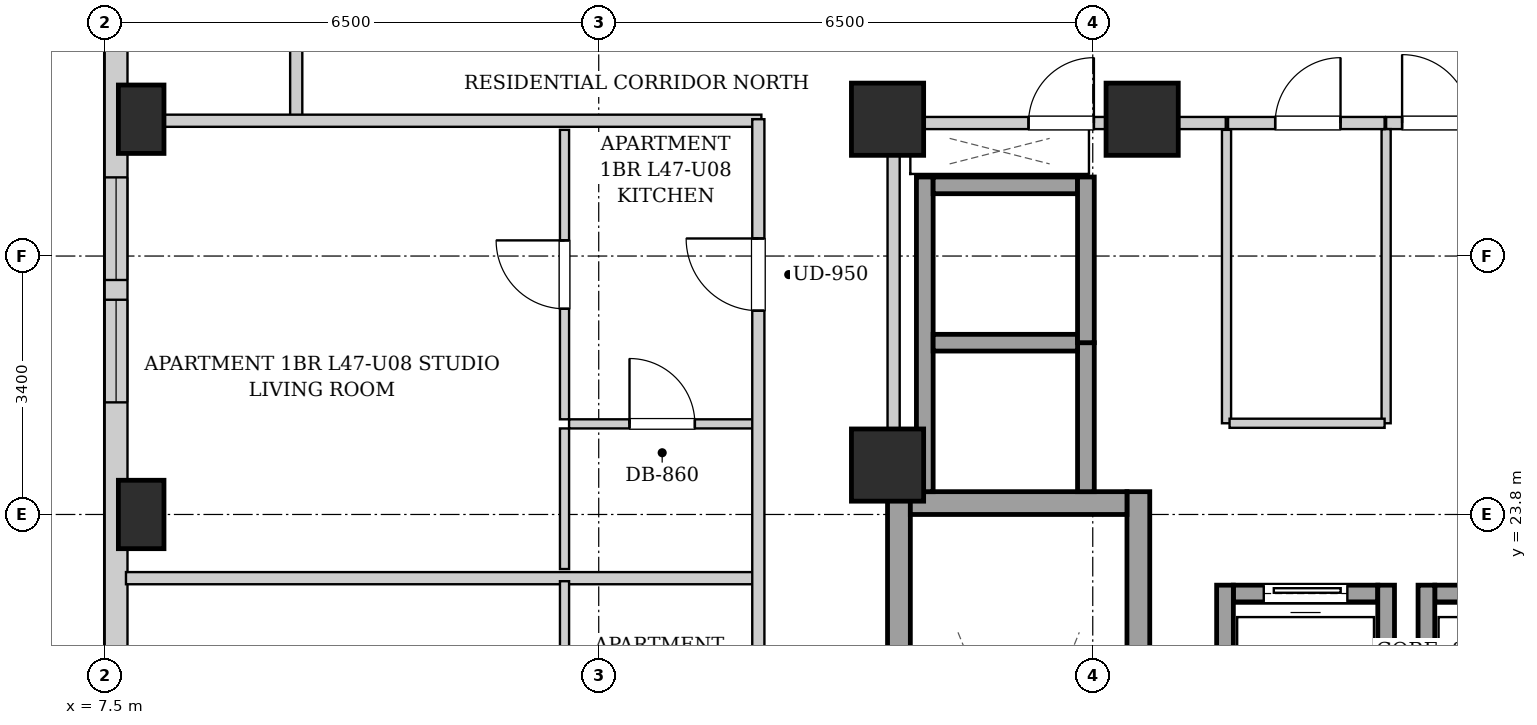
"""IFC4 building model, lengths in metres.
Left out: names, types, materials, properties, quantities, classifications, styles, units other than length and angle.
Written with IfcOpenShell. Run it as: python <this file> out.ifc"""

import sys

from ifc_helpers import new_model, si_unit, direction, frame, frame_2d, origin, origin_2d, place, context, subcontext, project, spatial, rectangle, extrude, element, fill, save


model = new_model("IFC4")
c1 = context("Model", 3, precision=1e-05, world=origin(), true_north=direction((0.0, 1.0)))
c2 = subcontext(c1, "Body", "Model", "MODEL_VIEW")
j1 = project(units=[si_unit("LENGTHUNIT", "METRE"), si_unit("PLANEANGLEUNIT", "RADIAN")], contexts=[c1])
p1 = place(None, origin())
s1 = spatial("IfcSite", under=j1, at=p1, CompositionType="ELEMENT")
p2 = place(p1, origin())
s2 = spatial("IfcBuilding", under=s1, at=p2, CompositionType="ELEMENT")
p3 = place(p2, frame((0.0, 0.0, 163.4)))
s3 = spatial("IfcBuildingStorey", under=s2, at=p3, CompositionType="ELEMENT", Elevation=163.4)
for number, where, z_axis, x_axis in (
    (1, (7.98, 23.8, 0.0), (0.0, 0.0, 1.0), (1.0, 0.0, 0.0)),
    (2, (7.98, 29.0, 0.0), (0.0, 0.0, 1.0), (1.0, 0.0, 0.0)),
):
    element("IfcColumn", number, at=place(p3, frame(where, z_axis=z_axis, x_axis=x_axis)), inside=s3, PredefinedType="COLUMN", context=c2, shape_type="SweptSolid", body=[
        extrude(rectangle(XDim=0.6, YDim=0.9, at=origin_2d()), origin(), (0.0, 0.0, 1.0), 3.25),
    ])
for number, where, z_axis, x_axis in (
    (3, (17.8, 29.0, 0.0), (0.0, 0.0, 1.0), (1.0, 0.0, 0.0)),
    (4, (21.15, 29.0, 0.0), (0.0, 0.0, 1.0), (1.0, 0.0, 0.0)),
    (5, (17.8, 24.45, 0.0), (0.0, 0.0, 1.0), (1.0, 0.0, 0.0)),
):
    element("IfcColumn", number, at=place(p3, frame(where, z_axis=z_axis, x_axis=x_axis)), inside=s3, PredefinedType="COLUMN", context=c2, shape_type="SweptSolid", body=[
        extrude(rectangle(XDim=0.95, YDim=0.95, at=origin_2d()), origin(), (0.0, 0.0, 1.0), 3.25),
    ])
p4 = place(p3, frame((7.65, 6.3, 0.0), z_axis=(0.0, 0.0, 1.0), x_axis=(0.0, 1.0, 0.0)))
e6 = element("IfcWall", 6, at=p4, inside=s3, PredefinedType="SOLIDWALL", context=c2, shape_type="SweptSolid", body=[
    extrude(rectangle(XDim=34.5, YDim=0.3, at=frame_2d((17.25, 0.0))), origin(), (0.0, 0.0, 1.0), 2.99),
])
p5 = place(p4, frame((1.425, 0.0, 0.55)))
e7 = element("IfcOpeningElement", 7, at=p5, cuts=e6, PredefinedType="OPENING", context=c2, shape_type="SweptSolid", body=[
    extrude(rectangle(XDim=1.35, YDim=1.2, at=frame_2d((0.675, 0.6))), frame((0.0, 0.16, 0.0), z_axis=(0.0, -1.0, 0.0), x_axis=(1.0, 0.0, 0.0)), (0.0, 0.0, 1.0), 0.32),
])
p6 = place(p4, frame((30.15, 0.0, 0.55)))
e8 = element("IfcOpeningElement", 8, at=p6, cuts=e6, PredefinedType="OPENING", context=c2, shape_type="SweptSolid", body=[
    extrude(rectangle(XDim=1.35, YDim=1.2, at=frame_2d((0.675, 0.6))), frame((0.0, 0.16, 0.0), z_axis=(0.0, -1.0, 0.0), x_axis=(1.0, 0.0, 0.0)), (0.0, 0.0, 1.0), 0.32),
])
p7 = place(p4, frame((28.31, 0.0, 0.55)))
e9 = element("IfcOpeningElement", 9, at=p7, cuts=e6, PredefinedType="OPENING", context=c2, shape_type="SweptSolid", body=[
    extrude(rectangle(XDim=1.35, YDim=1.2, at=frame_2d((0.675, 0.6))), frame((0.0, 0.16, 0.0), z_axis=(0.0, -1.0, 0.0), x_axis=(1.0, 0.0, 0.0)), (0.0, 0.0, 1.0), 0.32),
])
p8 = place(p4, frame((11.85, 0.0, 0.55)))
e10 = element("IfcOpeningElement", 10, at=p8, cuts=e6, PredefinedType="OPENING", context=c2, shape_type="SweptSolid", body=[
    extrude(rectangle(XDim=1.35, YDim=1.2, at=frame_2d((0.675, 0.6))), frame((0.0, 0.16, 0.0), z_axis=(0.0, -1.0, 0.0), x_axis=(1.0, 0.0, 0.0)), (0.0, 0.0, 1.0), 0.32),
])
p9 = place(p4, frame((9.31, 0.0, 0.55)))
e11 = element("IfcOpeningElement", 11, at=p9, cuts=e6, PredefinedType="OPENING", context=c2, shape_type="SweptSolid", body=[
    extrude(rectangle(XDim=1.35, YDim=1.2, at=frame_2d((0.675, 0.6))), frame((0.0, 0.16, 0.0), z_axis=(0.0, -1.0, 0.0), x_axis=(1.0, 0.0, 0.0)), (0.0, 0.0, 1.0), 0.32),
])
p10 = place(p4, frame((18.975, 0.0, 0.55)))
e12 = element("IfcOpeningElement", 12, at=p10, cuts=e6, PredefinedType="OPENING", context=c2, shape_type="SweptSolid", body=[
    extrude(rectangle(XDim=1.35, YDim=1.2, at=frame_2d((0.675, 0.6))), frame((0.0, 0.16, 0.0), z_axis=(0.0, -1.0, 0.0), x_axis=(1.0, 0.0, 0.0)), (0.0, 0.0, 1.0), 0.32),
])
p11 = place(p4, frame((20.585, 0.0, 0.55)))
e13 = element("IfcOpeningElement", 13, at=p11, cuts=e6, PredefinedType="OPENING", context=c2, shape_type="SweptSolid", body=[
    extrude(rectangle(XDim=1.35, YDim=1.2, at=frame_2d((0.675, 0.6))), frame((0.0, 0.16, 0.0), z_axis=(0.0, -1.0, 0.0), x_axis=(1.0, 0.0, 0.0)), (0.0, 0.0, 1.0), 0.32),
])
for number, where, z_axis, x_axis in (
    (14, (17.95, 15.1, 0.0), (0.0, 0.0, 1.0), (0.0, 1.0, 0.0)),
    (15, (21.1, 15.1, 0.0), (0.0, 0.0, 1.0), (0.0, 1.0, 0.0)),
):
    element("IfcWall", number, at=place(p3, frame(where, z_axis=z_axis, x_axis=x_axis)), inside=s3, PredefinedType="SHEAR", context=c2, shape_type="SweptSolid", body=[
        extrude(rectangle(XDim=9.0, YDim=0.3, at=frame_2d((4.5, 0.0))), origin(), (0.0, 0.0, 1.0), 2.99),
    ])
p12 = place(p3, frame((18.1, 23.95, 0.0), z_axis=(0.0, 0.0, 1.0), x_axis=(1.0, 0.0, 0.0)))
e16 = element("IfcWall", 16, at=p12, inside=s3, PredefinedType="SHEAR", context=c2, shape_type="SweptSolid", body=[
    extrude(rectangle(XDim=2.85, YDim=0.3, at=frame_2d((1.425, 0.0))), origin(), (0.0, 0.0, 1.0), 2.99),
])
p13 = place(p3, frame((22.35, 22.76, 0.0), z_axis=(0.0, 0.0, 1.0), x_axis=(1.0, 0.0, 0.0)))
e17 = element("IfcWall", 17, at=p13, inside=s3, PredefinedType="SHEAR", context=c2, shape_type="SweptSolid", body=[
    extrude(rectangle(XDim=1.9, YDim=0.22, at=frame_2d((0.95, 0.0))), origin(), (0.0, 0.0, 1.0), 2.99),
])
p14 = place(p13, frame((0.4, 0.0, 0.0)))
e18 = element("IfcOpeningElement", 18, at=p14, cuts=e17, PredefinedType="OPENING", context=c2, shape_type="SweptSolid", body=[
    extrude(rectangle(XDim=1.1, YDim=2.15, at=frame_2d((0.55, 1.075))), frame((0.0, 0.12, 0.0), z_axis=(0.0, -1.0, 0.0), x_axis=(1.0, 0.0, 0.0)), (0.0, 0.0, 1.0), 0.24),
])
for number, where, z_axis, x_axis in (
    (19, (22.24, 20.43, 0.0), (0.0, 0.0, 1.0), (0.0, 1.0, 0.0)),
    (20, (24.36, 20.43, 0.0), (0.0, 0.0, 1.0), (0.0, 1.0, 0.0)),
):
    element("IfcWall", number, at=place(p3, frame(where, z_axis=z_axis, x_axis=x_axis)), inside=s3, PredefinedType="SHEAR", context=c2, shape_type="SweptSolid", body=[
        extrude(rectangle(XDim=2.44, YDim=0.22, at=frame_2d((1.22, 0.0))), origin(), (0.0, 0.0, 1.0), 2.99),
    ])
p15 = place(p3, frame((25.0, 22.76, 0.0), z_axis=(0.0, 0.0, 1.0), x_axis=(1.0, 0.0, 0.0)))
e21 = element("IfcWall", 21, at=p15, inside=s3, PredefinedType="SHEAR", context=c2, shape_type="SweptSolid", body=[
    extrude(rectangle(XDim=1.9, YDim=0.22, at=frame_2d((0.95, 0.0))), origin(), (0.0, 0.0, 1.0), 2.99),
])
p16 = place(p15, frame((0.4, 0.0, 0.0)))
e22 = element("IfcOpeningElement", 22, at=p16, cuts=e21, PredefinedType="OPENING", context=c2, shape_type="SweptSolid", body=[
    extrude(rectangle(XDim=1.1, YDim=2.15, at=frame_2d((0.55, 1.075))), frame((0.0, 0.12, 0.0), z_axis=(0.0, -1.0, 0.0), x_axis=(1.0, 0.0, 0.0)), (0.0, 0.0, 1.0), 0.24),
])
p17 = place(p3, frame((24.89, 20.43, 0.0), z_axis=(0.0, 0.0, 1.0), x_axis=(0.0, 1.0, 0.0)))
e23 = element("IfcWall", 23, at=p17, inside=s3, PredefinedType="SHEAR", context=c2, shape_type="SweptSolid", body=[
    extrude(rectangle(XDim=2.44, YDim=0.22, at=frame_2d((1.22, 0.0))), origin(), (0.0, 0.0, 1.0), 2.99),
])
p18 = place(p3, frame((18.29, 24.1, 0.0), z_axis=(0.0, 0.0, 1.0), x_axis=(0.0, 1.0, 0.0)))
e24 = element("IfcWall", 24, at=p18, inside=s3, PredefinedType="SHEAR", context=c2, shape_type="SweptSolid", body=[
    extrude(rectangle(XDim=4.14, YDim=0.22, at=frame_2d((2.07, 0.0))), origin(), (0.0, 0.0, 1.0), 2.99),
])
p19 = place(p3, frame((20.41, 24.1, 0.0), z_axis=(0.0, 0.0, 1.0), x_axis=(0.0, 1.0, 0.0)))
e25 = element("IfcWall", 25, at=p19, inside=s3, PredefinedType="SHEAR", context=c2, shape_type="SweptSolid", body=[
    extrude(rectangle(XDim=1.96, YDim=0.22, at=frame_2d((0.98, 0.0))), origin(), (0.0, 0.0, 1.0), 2.99),
])
for number, where, z_axis, x_axis in (
    (26, (18.4, 26.06, 0.0), (0.0, 0.0, 1.0), (1.0, 0.0, 0.0)),
    (27, (18.4, 28.13, 0.0), (0.0, 0.0, 1.0), (1.0, 0.0, 0.0)),
):
    element("IfcWall", number, at=place(p3, frame(where, z_axis=z_axis, x_axis=x_axis)), inside=s3, PredefinedType="SHEAR", context=c2, shape_type="SweptSolid", body=[
        extrude(rectangle(XDim=1.9, YDim=0.22, at=frame_2d((0.95, 0.0))), origin(), (0.0, 0.0, 1.0), 2.99),
    ])
p20 = place(p3, frame((20.41, 26.06, 0.0), z_axis=(0.0, 0.0, 1.0), x_axis=(0.0, 1.0, 0.0)))
e28 = element("IfcWall", 28, at=p20, inside=s3, PredefinedType="SHEAR", context=c2, shape_type="SweptSolid", body=[
    extrude(rectangle(XDim=2.18, YDim=0.22, at=frame_2d((1.09, 0.0))), origin(), (0.0, 0.0, 1.0), 2.99),
])
p21 = place(p3, frame((17.88, 24.12, 0.0), z_axis=(0.0, 0.0, 1.0), x_axis=(0.0, 1.0, 0.0)))
e29 = element("IfcWall", 29, at=p21, inside=s3, PredefinedType="PARTITIONING", context=c2, shape_type="SweptSolid", body=[
    extrude(rectangle(XDim=4.76, YDim=0.16, at=frame_2d((2.38, 0.0))), origin(), (0.0, 0.0, 1.0), 2.99),
])
p22 = place(p3, frame((24.36, 28.95, 0.0), z_axis=(0.0, 0.0, 1.0), x_axis=(1.0, 0.0, 0.0)))
e30 = element("IfcWall", 30, at=p22, inside=s3, PredefinedType="PARTITIONING", context=c2, shape_type="SweptSolid", body=[
    extrude(rectangle(XDim=1.32, YDim=0.16, at=frame_2d((0.66, 0.0))), origin(), (0.0, 0.0, 1.0), 2.442),
])
p23 = place(p22, frame((0.21, 0.0, 0.0)))
e31 = element("IfcOpeningElement", 31, at=p23, cuts=e30, PredefinedType="OPENING", context=c2, shape_type="SweptSolid", body=[
    extrude(rectangle(XDim=0.9, YDim=2.05, at=frame_2d((0.45, 1.025))), frame((0.0, 0.09, 0.0), z_axis=(0.0, -1.0, 0.0), x_axis=(1.0, 0.0, 0.0)), (0.0, 0.0, 1.0), 0.18),
])
p24 = place(p3, frame((17.96, 28.95, 0.0), z_axis=(0.0, 0.0, 1.0), x_axis=(1.0, 0.0, 0.0)))
e32 = element("IfcWall", 32, at=p24, inside=s3, PredefinedType="PARTITIONING", context=c2, shape_type="SweptSolid", body=[
    extrude(rectangle(XDim=4.29, YDim=0.16, at=frame_2d((2.145, 0.0))), origin(), (0.0, 0.0, 1.0), 2.442),
])
p25 = place(p24, frame((1.695, 0.0, 0.0)))
e33 = element("IfcOpeningElement", 33, at=p25, cuts=e32, PredefinedType="OPENING", context=c2, shape_type="SweptSolid", body=[
    extrude(rectangle(XDim=0.86, YDim=2.05, at=frame_2d((0.43, 1.025))), frame((0.0, 0.09, 0.0), z_axis=(0.0, -1.0, 0.0), x_axis=(1.0, 0.0, 0.0)), (0.0, 0.0, 1.0), 0.18),
])
p26 = place(p3, frame((24.36, 25.0, 0.0), z_axis=(0.0, 0.0, 1.0), x_axis=(0.0, 1.0, 0.0)))
e34 = element("IfcWall", 34, at=p26, inside=s3, PredefinedType="PARTITIONING", context=c2, shape_type="SweptSolid", body=[
    extrude(rectangle(XDim=3.87, YDim=0.12, at=frame_2d((1.935, 0.0))), origin(), (0.0, 0.0, 1.0), 2.99),
])
p27 = place(p3, frame((22.26, 25.0, 0.0), z_axis=(0.0, 0.0, 1.0), x_axis=(0.0, 1.0, 0.0)))
e35 = element("IfcWall", 35, at=p27, inside=s3, PredefinedType="PARTITIONING", context=c2, shape_type="SweptSolid", body=[
    extrude(rectangle(XDim=3.86, YDim=0.12, at=frame_2d((1.93, 0.0))), origin(), (0.0, 0.0, 1.0), 2.99),
])
p28 = place(p3, frame((22.3, 25.0, 0.0), z_axis=(0.0, 0.0, 1.0), x_axis=(1.0, 0.0, 0.0)))
e36 = element("IfcWall", 36, at=p28, inside=s3, PredefinedType="PARTITIONING", context=c2, shape_type="SweptSolid", body=[
    extrude(rectangle(XDim=2.04, YDim=0.12, at=frame_2d((1.02, 0.0))), origin(), (0.0, 0.0, 1.0), 2.99),
])
p29 = place(p3, frame((22.28, 28.95, 0.0), z_axis=(0.0, 0.0, 1.0), x_axis=(1.0, 0.0, 0.0)))
e37 = element("IfcWall", 37, at=p29, inside=s3, PredefinedType="PARTITIONING", context=c2, shape_type="SweptSolid", body=[
    extrude(rectangle(XDim=2.06, YDim=0.16, at=frame_2d((1.03, 0.0))), origin(), (0.0, 0.0, 1.0), 2.442),
])
p30 = place(p29, frame((0.62, 0.0, 0.0)))
e38 = element("IfcOpeningElement", 38, at=p30, cuts=e37, PredefinedType="OPENING", context=c2, shape_type="SweptSolid", body=[
    extrude(rectangle(XDim=0.86, YDim=2.05, at=frame_2d((0.43, 1.025))), frame((0.0, 0.09, 0.0), z_axis=(0.0, -1.0, 0.0), x_axis=(1.0, 0.0, 0.0)), (0.0, 0.0, 1.0), 0.18),
])
p31 = place(p3, frame((10.02, 28.98, 0.0), z_axis=(0.0, 0.0, 1.0), x_axis=(0.0, 1.0, 0.0)))
e39 = element("IfcWall", 39, at=p31, inside=s3, PredefinedType="PARTITIONING", context=c2, shape_type="SweptSolid", body=[
    extrude(rectangle(XDim=1.74, YDim=0.16, at=frame_2d((0.87, 0.0))), origin(), (0.0, 0.0, 1.0), 2.99),
])
p32 = place(p3, frame((7.78, 28.98, 0.0), z_axis=(0.0, 0.0, 1.0), x_axis=(1.0, 0.0, 0.0)))
e40 = element("IfcWall", 40, at=p32, inside=s3, PredefinedType="PARTITIONING", context=c2, shape_type="SweptSolid", body=[
    extrude(rectangle(XDim=8.36, YDim=0.16, at=frame_2d((4.18, 0.0))), origin(), (0.0, 0.0, 1.0), 2.442),
])
p33 = place(p3, frame((7.78, 22.962, 0.0), z_axis=(0.0, 0.0, 1.0), x_axis=(1.0, 0.0, 0.0)))
e41 = element("IfcWall", 41, at=p33, inside=s3, PredefinedType="PARTITIONING", context=c2, shape_type="SweptSolid", body=[
    extrude(rectangle(XDim=8.28, YDim=0.16, at=frame_2d((4.14, 0.0))), origin(), (0.0, 0.0, 1.0), 2.99),
])
p34 = place(p3, frame((13.55, 17.489, 0.0), z_axis=(0.0, 0.0, 1.0), x_axis=(0.0, 1.0, 0.0)))
e42 = element("IfcWall", 42, at=p34, inside=s3, PredefinedType="PARTITIONING", context=c2, shape_type="SweptSolid", body=[
    extrude(rectangle(XDim=5.433, YDim=0.12, at=frame_2d((2.717, 0.0))), origin(), (0.0, 0.0, 1.0), 2.99),
])
p35 = place(p34, frame((2.266, 0.0, 0.0)))
e43 = element("IfcOpeningElement", 43, at=p35, cuts=e42, PredefinedType="OPENING", context=c2, shape_type="SweptSolid", body=[
    extrude(rectangle(XDim=0.9, YDim=2.05, at=frame_2d((0.45, 1.025))), frame((0.0, 0.07, 0.0), z_axis=(0.0, -1.0, 0.0), x_axis=(1.0, 0.0, 0.0)), (0.0, 0.0, 1.0), 0.14),
])
p36 = place(p3, frame((13.61, 24.992, 0.0), z_axis=(0.0, 0.0, 1.0), x_axis=(1.0, 0.0, 0.0)))
e44 = element("IfcWall", 44, at=p36, inside=s3, PredefinedType="PARTITIONING", context=c2, shape_type="SweptSolid", body=[
    extrude(rectangle(XDim=2.45, YDim=0.12, at=frame_2d((1.225, 0.0))), origin(), (0.0, 0.0, 1.0), 2.99),
])
p37 = place(p36, frame((0.795, 0.0, 0.0)))
e45 = element("IfcOpeningElement", 45, at=p37, cuts=e44, PredefinedType="OPENING", context=c2, shape_type="SweptSolid", body=[
    extrude(rectangle(XDim=0.86, YDim=2.05, at=frame_2d((0.43, 1.025))), frame((0.0, 0.07, 0.0), z_axis=(0.0, -1.0, 0.0), x_axis=(1.0, 0.0, 0.0)), (0.0, 0.0, 1.0), 0.14),
])
p38 = place(p3, frame((13.55, 23.082, 0.0), z_axis=(0.0, 0.0, 1.0), x_axis=(0.0, 1.0, 0.0)))
e46 = element("IfcWall", 46, at=p38, inside=s3, PredefinedType="PARTITIONING", context=c2, shape_type="SweptSolid", body=[
    extrude(rectangle(XDim=1.85, YDim=0.12, at=frame_2d((0.925, 0.0))), origin(), (0.0, 0.0, 1.0), 2.99),
])
p39 = place(p3, frame((13.55, 25.052, 0.0), z_axis=(0.0, 0.0, 1.0), x_axis=(0.0, 1.0, 0.0)))
e47 = element("IfcWall", 47, at=p39, inside=s3, PredefinedType="PARTITIONING", context=c2, shape_type="SweptSolid", body=[
    extrude(rectangle(XDim=3.808, YDim=0.12, at=frame_2d((1.904, 0.0))), origin(), (0.0, 0.0, 1.0), 2.99),
])
p40 = place(p39, frame((1.454, 0.0, 0.0)))
e48 = element("IfcOpeningElement", 48, at=p40, cuts=e47, PredefinedType="OPENING", context=c2, shape_type="SweptSolid", body=[
    extrude(rectangle(XDim=0.9, YDim=2.05, at=frame_2d((0.45, 1.025))), frame((0.0, 0.07, 0.0), z_axis=(0.0, -1.0, 0.0), x_axis=(1.0, 0.0, 0.0)), (0.0, 0.0, 1.0), 0.14),
])
p41 = place(p3, frame((16.1, 15.07, 0.0), z_axis=(0.0, 0.0, 1.0), x_axis=(0.0, 1.0, 0.0)))
e49 = element("IfcWall", 49, at=p41, inside=s3, PredefinedType="PARTITIONING", context=c2, shape_type="SweptSolid", body=[
    extrude(rectangle(XDim=13.93, YDim=0.16, at=frame_2d((6.965, 0.0))), origin(), (0.0, 0.0, 1.0), 2.99),
])
p42 = place(p41, frame((4.661, 0.0, 0.0)))
e50 = element("IfcOpeningElement", 50, at=p42, cuts=e49, PredefinedType="OPENING", context=c2, shape_type="SweptSolid", body=[
    extrude(rectangle(XDim=0.95, YDim=2.1, at=frame_2d((0.475, 1.05))), frame((0.0, 0.09, 0.0), z_axis=(0.0, -1.0, 0.0), x_axis=(1.0, 0.0, 0.0)), (0.0, 0.0, 1.0), 0.18),
])
p43 = place(p41, frame((11.411, 0.0, 0.0)))
e51 = element("IfcOpeningElement", 51, at=p43, cuts=e49, PredefinedType="OPENING", context=c2, shape_type="SweptSolid", body=[
    extrude(rectangle(XDim=0.95, YDim=2.1, at=frame_2d((0.475, 1.05))), frame((0.0, 0.09, 0.0), z_axis=(0.0, -1.0, 0.0), x_axis=(1.0, 0.0, 0.0)), (0.0, 0.0, 1.0), 0.18),
])
p44 = place(p14, origin())
e52 = element("IfcDoor", 52, at=p44, inside=s3, OperationType="SLIDING_TO_LEFT", PredefinedType="DOOR", context=c2, shape_type="SweptSolid", body=[
    extrude(rectangle(XDim=1.1, YDim=2.15, at=frame_2d((0.55, 1.075))), frame((0.0, 0.025, 0.0), z_axis=(0.0, -1.0, 0.0), x_axis=(1.0, 0.0, 0.0)), (0.0, 0.0, 1.0), 0.05),
])
fill(e18, e52)
p45 = place(p23, origin())
e53 = element("IfcDoor", 53, at=p45, inside=s3, OperationType="SINGLE_SWING_LEFT", PredefinedType="DOOR", context=c2, shape_type="SweptSolid", body=[
    extrude(rectangle(XDim=0.9, YDim=2.05, at=frame_2d((0.45, 1.025))), frame((0.0, 0.025, 0.0), z_axis=(0.0, -1.0, 0.0), x_axis=(1.0, 0.0, 0.0)), (0.0, 0.0, 1.0), 0.05),
])
fill(e31, e53)
p46 = place(p25, origin())
e54 = element("IfcDoor", 54, at=p46, inside=s3, OperationType="SINGLE_SWING_RIGHT", PredefinedType="DOOR", context=c2, shape_type="SweptSolid", body=[
    extrude(rectangle(XDim=0.86, YDim=2.05, at=frame_2d((0.43, 1.025))), frame((0.0, 0.025, 0.0), z_axis=(0.0, -1.0, 0.0), x_axis=(1.0, 0.0, 0.0)), (0.0, 0.0, 1.0), 0.05),
])
fill(e33, e54)
p47 = place(p30, origin())
e55 = element("IfcDoor", 55, at=p47, inside=s3, OperationType="SINGLE_SWING_RIGHT", PredefinedType="DOOR", context=c2, shape_type="SweptSolid", body=[
    extrude(rectangle(XDim=0.86, YDim=2.05, at=frame_2d((0.43, 1.025))), frame((0.0, 0.025, 0.0), z_axis=(0.0, -1.0, 0.0), x_axis=(1.0, 0.0, 0.0)), (0.0, 0.0, 1.0), 0.05),
])
fill(e38, e55)
p48 = place(p37, origin())
e56 = element("IfcDoor", 56, at=p48, inside=s3, OperationType="SINGLE_SWING_LEFT", PredefinedType="DOOR", context=c2, shape_type="SweptSolid", body=[
    extrude(rectangle(XDim=0.86, YDim=2.05, at=frame_2d((0.43, 1.025))), frame((0.0, 0.025, 0.0), z_axis=(0.0, -1.0, 0.0), x_axis=(1.0, 0.0, 0.0)), (0.0, 0.0, 1.0), 0.05),
])
fill(e45, e56)
p49 = place(p40, origin())
e57 = element("IfcDoor", 57, at=p49, inside=s3, OperationType="SINGLE_SWING_RIGHT", PredefinedType="DOOR", context=c2, shape_type="SweptSolid", body=[
    extrude(rectangle(XDim=0.9, YDim=2.05, at=frame_2d((0.45, 1.025))), frame((0.0, 0.025, 0.0), z_axis=(0.0, -1.0, 0.0), x_axis=(1.0, 0.0, 0.0)), (0.0, 0.0, 1.0), 0.05),
])
fill(e48, e57)
p50 = place(p43, origin())
e58 = element("IfcDoor", 58, at=p50, inside=s3, OperationType="SINGLE_SWING_RIGHT", PredefinedType="DOOR", context=c2, shape_type="SweptSolid", body=[
    extrude(rectangle(XDim=0.95, YDim=2.1, at=frame_2d((0.475, 1.05))), frame((0.0, 0.025, 0.0), z_axis=(0.0, -1.0, 0.0), x_axis=(1.0, 0.0, 0.0)), (0.0, 0.0, 1.0), 0.05),
])
fill(e51, e58)
p51 = place(p10, origin())
e59 = element("IfcWindow", 59, at=p51, inside=s3, PartitioningType="SINGLE_PANEL", PredefinedType="WINDOW", context=c2, shape_type="SweptSolid", body=[
    extrude(rectangle(XDim=1.35, YDim=1.2, at=frame_2d((0.675, 0.6))), frame((0.0, 0.03, 0.0), z_axis=(0.0, -1.0, 0.0), x_axis=(1.0, 0.0, 0.0)), (0.0, 0.0, 1.0), 0.06),
])
fill(e12, e59)
p52 = place(p11, origin())
e60 = element("IfcWindow", 60, at=p52, inside=s3, PartitioningType="SINGLE_PANEL", PredefinedType="WINDOW", context=c2, shape_type="SweptSolid", body=[
    extrude(rectangle(XDim=1.35, YDim=1.2, at=frame_2d((0.675, 0.6))), frame((0.0, 0.03, 0.0), z_axis=(0.0, -1.0, 0.0), x_axis=(1.0, 0.0, 0.0)), (0.0, 0.0, 1.0), 0.06),
])
fill(e13, e60)
save(model, sys.argv[1])
